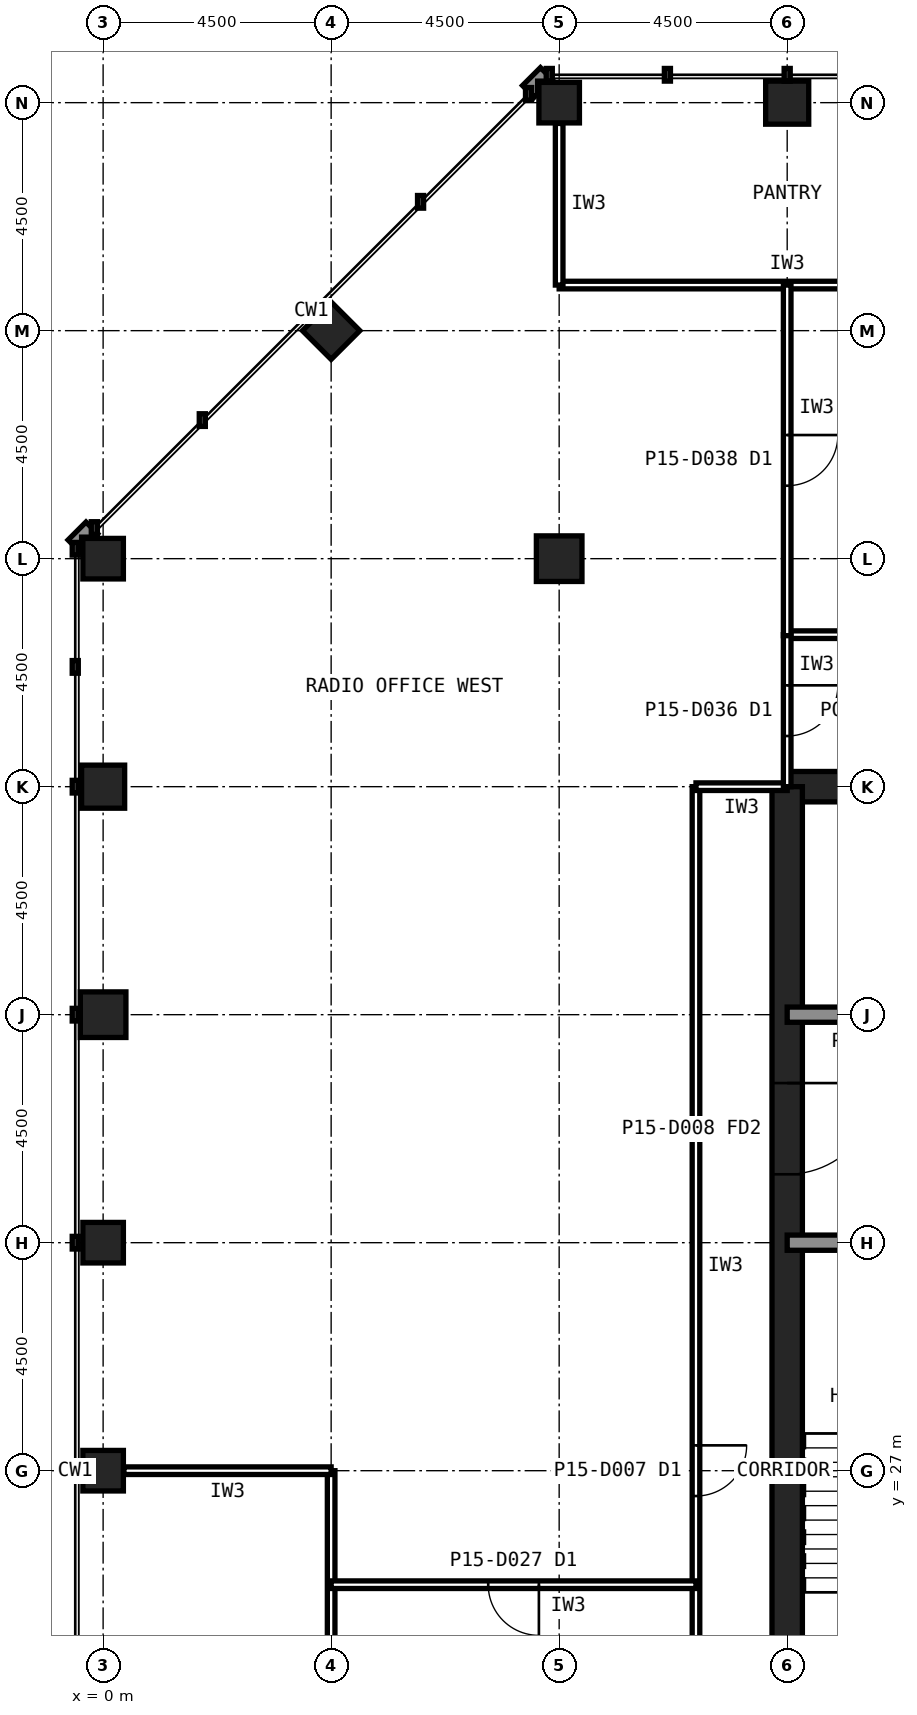
"""IFC4 building model, lengths in metres.
Left out: names, types, materials, properties, quantities, classifications, styles, units other than length and angle.
Written with IfcOpenShell. Run it as: python <this file> out.ifc"""

import sys

from ifc_helpers import new_model, si_unit, direction, frame, frame_2d, origin, origin_2d, place, context, subcontext, project, spatial, rectangle, hollow_rectangle, extrude, element, fill, save


model = new_model("IFC4")
c1 = context("Model", 3, precision=1e-05, world=origin(), true_north=direction((0.0, 1.0)))
c2 = subcontext(c1, "Body", "Model", "MODEL_VIEW")
j1 = project(units=[si_unit("LENGTHUNIT", "METRE"), si_unit("PLANEANGLEUNIT", "RADIAN")], contexts=[c1])
p1 = place(None, origin())
s1 = spatial("IfcSite", under=j1, at=p1, CompositionType="ELEMENT")
p2 = place(p1, origin())
s2 = spatial("IfcBuilding", under=s1, at=p2, CompositionType="ELEMENT")
p3 = place(p2, frame((0.0, 0.0, 62.6)))
s3 = spatial("IfcBuildingStorey", under=s2, at=p3, CompositionType="ELEMENT", Elevation=62.6)
p4 = place(p3, frame((13.5, 54.0, 0.0), z_axis=(0.0, 0.0, 1.0), x_axis=(1.0, 0.0, 0.0)))
e1 = element("IfcColumn", 1, at=p4, inside=s3, PredefinedType="COLUMN", context=c2, shape_type="SweptSolid", body=[
    extrude(hollow_rectangle(XDim=0.85, YDim=0.85, WallThickness=0.05, at=origin_2d()), origin(), (0.0, 0.0, 1.0), 4.2),
])
for number, where, z_axis, x_axis in (
    (2, (9.0, 54.0, 0.0), (0.0, 0.0, 1.0), (1.0, 0.0, 0.0)),
    (3, (0.0, 45.0, 0.0), (0.0, 0.0, 1.0), (1.0, 0.0, 0.0)),
):
    element("IfcColumn", number, at=place(p3, frame(where, z_axis=z_axis, x_axis=x_axis)), inside=s3, PredefinedType="COLUMN", context=c2, shape_type="SweptSolid", body=[
        extrude(hollow_rectangle(XDim=0.8, YDim=0.8, WallThickness=0.045, at=origin_2d()), origin(), (0.0, 0.0, 1.0), 4.2),
    ])
p5 = place(p3, frame((0.0, 40.5, 0.0), z_axis=(0.0, 0.0, 1.0), x_axis=(1.0, 0.0, 0.0)))
e4 = element("IfcColumn", 4, at=p5, inside=s3, PredefinedType="COLUMN", context=c2, shape_type="SweptSolid", body=[
    extrude(hollow_rectangle(XDim=0.85, YDim=0.85, WallThickness=0.05, at=origin_2d()), origin(), (0.0, 0.0, 1.0), 4.2),
])
p6 = place(p3, frame((0.0, 36.0, 0.0), z_axis=(0.0, 0.0, 1.0), x_axis=(1.0, 0.0, 0.0)))
e5 = element("IfcColumn", 5, at=p6, inside=s3, PredefinedType="COLUMN", context=c2, shape_type="SweptSolid", body=[
    extrude(hollow_rectangle(XDim=0.9, YDim=0.9, WallThickness=0.063, at=origin_2d()), origin(), (0.0, 0.0, 1.0), 4.2),
])
for number, where, z_axis, x_axis in (
    (6, (0.0, 31.5, 0.0), (0.0, 0.0, 1.0), (1.0, 0.0, 0.0)),
    (7, (0.0, 27.0, 0.0), (0.0, 0.0, 1.0), (1.0, 0.0, 0.0)),
    (8, (4.5, 49.5, 0.0), (0.0, 0.0, 1.0), (0.707, 0.707, 0.0)),
):
    element("IfcColumn", number, at=place(p3, frame(where, z_axis=z_axis, x_axis=x_axis)), inside=s3, PredefinedType="COLUMN", context=c2, shape_type="SweptSolid", body=[
        extrude(hollow_rectangle(XDim=0.8, YDim=0.8, WallThickness=0.045, at=origin_2d()), origin(), (0.0, 0.0, 1.0), 4.2),
    ])
p7 = place(p3, frame((9.0, 45.0, 0.0), z_axis=(0.0, 0.0, 1.0), x_axis=(1.0, 0.0, 0.0)))
e9 = element("IfcColumn", 9, at=p7, inside=s3, PredefinedType="COLUMN", context=c2, shape_type="SweptSolid", body=[
    extrude(hollow_rectangle(XDim=0.9, YDim=0.9, WallThickness=0.063, at=origin_2d()), origin(), (0.0, 0.0, 1.0), 4.2),
])
p8 = place(p3, frame((40.5, 40.5, 0.0), z_axis=(0.0, 0.0, 1.0), x_axis=(-1.0, 0.0, 0.0)))
e10 = element("IfcWall", 10, at=p8, inside=s3, PredefinedType="SHEAR", context=c2, shape_type="SweptSolid", body=[
    extrude(rectangle(XDim=27.0, YDim=0.6, at=frame_2d((13.5, 0.0))), origin(), (0.0, 0.0, 1.0), 4.2),
])
p9 = place(p3, frame((13.5, 40.5, 0.0), z_axis=(0.0, 0.0, 1.0), x_axis=(0.0, -1.0, 0.0)))
e11 = element("IfcWall", 11, at=p9, inside=s3, PredefinedType="SHEAR", context=c2, shape_type="SweptSolid", body=[
    extrude(rectangle(XDim=27.0, YDim=0.6, at=frame_2d((13.5, 0.0))), origin(), (0.0, 0.0, 1.0), 4.2),
])
p10 = place(p9, frame((19.65, 0.0, 0.0)))
e12 = element("IfcOpeningElement", 12, at=p10, cuts=e11, PredefinedType="OPENING", context=c2, shape_type="SweptSolid", body=[
    extrude(rectangle(XDim=1.2, YDim=2.1, at=frame_2d((0.6, 1.05))), frame((0.0, 0.31, 0.0), z_axis=(0.0, -1.0, 0.0), x_axis=(1.0, 0.0, 0.0)), (0.0, 0.0, 1.0), 0.62),
])
p11 = place(p9, frame((5.85, 0.0, 0.0)))
e13 = element("IfcOpeningElement", 13, at=p11, cuts=e11, PredefinedType="OPENING", context=c2, shape_type="SweptSolid", body=[
    extrude(rectangle(XDim=1.8, YDim=2.1, at=frame_2d((0.9, 1.05))), frame((0.0, 0.31, 0.0), z_axis=(0.0, -1.0, 0.0), x_axis=(1.0, 0.0, 0.0)), (0.0, 0.0, 1.0), 0.62),
])
p12 = place(p3, frame((13.5, 36.0, 0.0), z_axis=(0.0, 0.0, 1.0), x_axis=(1.0, 0.0, 0.0)))
e14 = element("IfcWall", 14, at=p12, inside=s3, PredefinedType="SOLIDWALL", context=c2, shape_type="SweptSolid", body=[
    extrude(rectangle(XDim=27.0, YDim=0.3, at=frame_2d((13.5, 0.0))), origin(), (0.0, 0.0, 1.0), 4.04),
])
p13 = place(p12, frame((1.8, 0.0, 0.0)))
e15 = element("IfcOpeningElement", 15, at=p13, cuts=e14, PredefinedType="OPENING", context=c2, shape_type="SweptSolid", body=[
    extrude(rectangle(XDim=0.9, YDim=2.1, at=frame_2d((0.45, 1.05))), frame((0.0, 0.16, 0.0), z_axis=(0.0, -1.0, 0.0), x_axis=(1.0, 0.0, 0.0)), (0.0, 0.0, 1.0), 0.32),
])
p14 = place(p12, frame((24.1, 0.0, 0.0)))
e16 = element("IfcOpeningElement", 16, at=p14, cuts=e14, PredefinedType="OPENING", context=c2, shape_type="SweptSolid", body=[
    extrude(rectangle(XDim=1.3, YDim=2.2, at=frame_2d((0.65, 1.1))), frame((0.0, 0.16, 0.0), z_axis=(0.0, -1.0, 0.0), x_axis=(1.0, 0.0, 0.0)), (0.0, 0.0, 1.0), 0.32),
])
p15 = place(p3, frame((13.5, 31.5, 0.0), z_axis=(0.0, 0.0, 1.0), x_axis=(1.0, 0.0, 0.0)))
e17 = element("IfcWall", 17, at=p15, inside=s3, PredefinedType="SOLIDWALL", context=c2, shape_type="SweptSolid", body=[
    extrude(rectangle(XDim=27.0, YDim=0.3, at=frame_2d((13.5, 0.0))), origin(), (0.0, 0.0, 1.0), 4.04),
])
p16 = place(p15, frame((24.15, 0.0, 0.0)))
e18 = element("IfcOpeningElement", 18, at=p16, cuts=e17, PredefinedType="OPENING", context=c2, shape_type="SweptSolid", body=[
    extrude(rectangle(XDim=1.2, YDim=2.1, at=frame_2d((0.6, 1.05))), frame((0.0, 0.16, 0.0), z_axis=(0.0, -1.0, 0.0), x_axis=(1.0, 0.0, 0.0)), (0.0, 0.0, 1.0), 0.32),
])
p17 = place(p15, frame((15.3, 0.0, 0.0)))
e19 = element("IfcOpeningElement", 19, at=p17, cuts=e17, PredefinedType="OPENING", context=c2, shape_type="SweptSolid", body=[
    extrude(rectangle(XDim=0.9, YDim=2.1, at=frame_2d((0.45, 1.05))), frame((0.0, 0.16, 0.0), z_axis=(0.0, -1.0, 0.0), x_axis=(1.0, 0.0, 0.0)), (0.0, 0.0, 1.0), 0.32),
])
p18 = place(p15, frame((19.8, 0.0, 0.0)))
e20 = element("IfcOpeningElement", 20, at=p18, cuts=e17, PredefinedType="OPENING", context=c2, shape_type="SweptSolid", body=[
    extrude(rectangle(XDim=0.9, YDim=2.1, at=frame_2d((0.45, 1.05))), frame((0.0, 0.16, 0.0), z_axis=(0.0, -1.0, 0.0), x_axis=(1.0, 0.0, 0.0)), (0.0, 0.0, 1.0), 0.32),
])
p19 = place(p3, frame((11.7, 40.5, 0.0), z_axis=(0.0, 0.0, 1.0), x_axis=(0.0, -1.0, 0.0)))
e21 = element("IfcWall", 21, at=p19, inside=s3, PredefinedType="PARTITIONING", context=c2, shape_type="SweptSolid", body=[
    extrude(rectangle(XDim=27.0, YDim=0.15, at=frame_2d((13.5, 0.0))), origin(), (0.0, 0.0, 1.0), 4.04),
])
p20 = place(p19, frame((13.0, 0.0, 0.0)))
e22 = element("IfcOpeningElement", 22, at=p20, cuts=e21, PredefinedType="OPENING", context=c2, shape_type="SweptSolid", body=[
    extrude(rectangle(XDim=1.0, YDim=2.1, at=frame_2d((0.5, 1.05))), frame((0.0, 0.085, 0.0), z_axis=(0.0, -1.0, 0.0), x_axis=(1.0, 0.0, 0.0)), (0.0, 0.0, 1.0), 0.17),
])
p21 = place(p3, frame((13.5, 40.5, 0.0), z_axis=(0.0, 0.0, 1.0), x_axis=(-1.0, 0.0, 0.0)))
e23 = element("IfcWall", 23, at=p21, inside=s3, PredefinedType="PARTITIONING", context=c2, shape_type="SweptSolid", body=[
    extrude(rectangle(XDim=1.8, YDim=0.15, at=frame_2d((0.9, 0.0))), origin(), (0.0, 0.0, 1.0), 3.189),
])
p22 = place(p3, frame((16.875, 43.5, 0.0), z_axis=(0.0, 0.0, 1.0), x_axis=(-1.0, 0.0, 0.0)))
e24 = element("IfcWall", 24, at=p22, inside=s3, PredefinedType="PARTITIONING", context=c2, shape_type="SweptSolid", body=[
    extrude(rectangle(XDim=3.375, YDim=0.15, at=frame_2d((1.688, 0.0))), origin(), (0.0, 0.0, 1.0), 4.04),
])
p23 = place(p3, frame((13.5, 43.5, 0.0), z_axis=(0.0, 0.0, 1.0), x_axis=(0.0, -1.0, 0.0)))
e25 = element("IfcWall", 25, at=p23, inside=s3, PredefinedType="PARTITIONING", context=c2, shape_type="SweptSolid", body=[
    extrude(rectangle(XDim=3.0, YDim=0.15, at=frame_2d((1.5, 0.0))), origin(), (0.0, 0.0, 1.0), 3.189),
])
p24 = place(p23, frame((1.0, 0.0, 0.0)))
e26 = element("IfcOpeningElement", 26, at=p24, cuts=e25, PredefinedType="OPENING", context=c2, shape_type="SweptSolid", body=[
    extrude(rectangle(XDim=1.0, YDim=2.1, at=frame_2d((0.5, 1.05))), frame((0.0, 0.085, 0.0), z_axis=(0.0, -1.0, 0.0), x_axis=(1.0, 0.0, 0.0)), (0.0, 0.0, 1.0), 0.17),
])
p25 = place(p3, frame((4.5, 18.0, 0.0), z_axis=(0.0, 0.0, 1.0), x_axis=(0.0, 1.0, 0.0)))
e27 = element("IfcWall", 27, at=p25, inside=s3, PredefinedType="PARTITIONING", context=c2, shape_type="SweptSolid", body=[
    extrude(rectangle(XDim=9.0, YDim=0.15, at=frame_2d((4.5, 0.0))), origin(), (0.0, 0.0, 1.0), 4.04),
])
p26 = place(p25, frame((4.0, 0.0, 0.0)))
e28 = element("IfcOpeningElement", 28, at=p26, cuts=e27, PredefinedType="OPENING", context=c2, shape_type="SweptSolid", body=[
    extrude(rectangle(XDim=1.0, YDim=2.1, at=frame_2d((0.5, 1.05))), frame((0.0, 0.085, 0.0), z_axis=(0.0, -1.0, 0.0), x_axis=(1.0, 0.0, 0.0)), (0.0, 0.0, 1.0), 0.17),
])
p27 = place(p3, frame((4.5, 27.0, 0.0), z_axis=(0.0, 0.0, 1.0), x_axis=(-1.0, 0.0, 0.0)))
e29 = element("IfcWall", 29, at=p27, inside=s3, PredefinedType="PARTITIONING", context=c2, shape_type="SweptSolid", body=[
    extrude(rectangle(XDim=4.09, YDim=0.15, at=frame_2d((2.045, 0.0))), origin(), (0.0, 0.0, 1.0), 3.189),
])
p28 = place(p3, frame((9.0, 50.4, 0.0), z_axis=(0.0, 0.0, 1.0), x_axis=(1.0, 0.0, 0.0)))
e30 = element("IfcWall", 30, at=p28, inside=s3, PredefinedType="PARTITIONING", context=c2, shape_type="SweptSolid", body=[
    extrude(rectangle(XDim=9.0, YDim=0.15, at=frame_2d((4.5, 0.0))), origin(), (0.0, 0.0, 1.0), 4.04),
])
p29 = place(p3, frame((9.0, 53.59, 0.0), z_axis=(0.0, 0.0, 1.0), x_axis=(0.0, -1.0, 0.0)))
e31 = element("IfcWall", 31, at=p29, inside=s3, PredefinedType="PARTITIONING", context=c2, shape_type="SweptSolid", body=[
    extrude(rectangle(XDim=3.19, YDim=0.15, at=frame_2d((1.595, 0.0))), origin(), (0.0, 0.0, 1.0), 3.429),
])
p30 = place(p3, frame((13.5, 50.4, 0.0), z_axis=(0.0, 0.0, 1.0), x_axis=(0.0, -1.0, 0.0)))
e32 = element("IfcWall", 32, at=p30, inside=s3, PredefinedType="PARTITIONING", context=c2, shape_type="SweptSolid", body=[
    extrude(rectangle(XDim=6.92, YDim=0.15, at=frame_2d((3.46, 0.0))), origin(), (0.0, 0.0, 1.0), 3.189),
])
p31 = place(p30, frame((2.96, 0.0, 0.0)))
e33 = element("IfcOpeningElement", 33, at=p31, cuts=e32, PredefinedType="OPENING", context=c2, shape_type="SweptSolid", body=[
    extrude(rectangle(XDim=1.0, YDim=2.1, at=frame_2d((0.5, 1.05))), frame((0.0, 0.085, 0.0), z_axis=(0.0, -1.0, 0.0), x_axis=(1.0, 0.0, 0.0)), (0.0, 0.0, 1.0), 0.17),
])
p32 = place(p3, frame((11.7, 24.75, 0.0), z_axis=(0.0, 0.0, 1.0), x_axis=(-1.0, 0.0, 0.0)))
e34 = element("IfcWall", 34, at=p32, inside=s3, PredefinedType="PARTITIONING", context=c2, shape_type="SweptSolid", body=[
    extrude(rectangle(XDim=7.2, YDim=0.15, at=frame_2d((3.6, 0.0))), origin(), (0.0, 0.0, 1.0), 4.04),
])
p33 = place(p32, frame((3.1, 0.0, 0.0)))
e35 = element("IfcOpeningElement", 35, at=p33, cuts=e34, PredefinedType="OPENING", context=c2, shape_type="SweptSolid", body=[
    extrude(rectangle(XDim=1.0, YDim=2.1, at=frame_2d((0.5, 1.05))), frame((0.0, 0.085, 0.0), z_axis=(0.0, -1.0, 0.0), x_axis=(1.0, 0.0, 0.0)), (0.0, 0.0, 1.0), 0.17),
])
p34 = place(p11, origin())
e36 = element("IfcDoor", 36, at=p34, inside=s3, OperationType="SINGLE_SWING_LEFT", PredefinedType="DOOR", context=c2, shape_type="SweptSolid", body=[
    extrude(rectangle(XDim=1.8, YDim=2.1, at=frame_2d((0.9, 1.05))), frame((0.0, 0.025, 0.0), z_axis=(0.0, -1.0, 0.0), x_axis=(1.0, 0.0, 0.0)), (0.0, 0.0, 1.0), 0.05),
])
fill(e13, e36)
p35 = place(p20, origin())
e37 = element("IfcDoor", 37, at=p35, inside=s3, OperationType="SINGLE_SWING_LEFT", PredefinedType="DOOR", context=c2, shape_type="SweptSolid", body=[
    extrude(rectangle(XDim=1.0, YDim=2.1, at=frame_2d((0.5, 1.05))), frame((0.0, 0.025, 0.0), z_axis=(0.0, -1.0, 0.0), x_axis=(1.0, 0.0, 0.0)), (0.0, 0.0, 1.0), 0.05),
])
fill(e22, e37)
p36 = place(p24, origin())
e38 = element("IfcDoor", 38, at=p36, inside=s3, OperationType="SINGLE_SWING_LEFT", PredefinedType="DOOR", context=c2, shape_type="SweptSolid", body=[
    extrude(rectangle(XDim=1.0, YDim=2.1, at=frame_2d((0.5, 1.05))), frame((0.0, 0.025, 0.0), z_axis=(0.0, -1.0, 0.0), x_axis=(1.0, 0.0, 0.0)), (0.0, 0.0, 1.0), 0.05),
])
fill(e26, e38)
p37 = place(p31, origin())
e39 = element("IfcDoor", 39, at=p37, inside=s3, OperationType="SINGLE_SWING_LEFT", PredefinedType="DOOR", context=c2, shape_type="SweptSolid", body=[
    extrude(rectangle(XDim=1.0, YDim=2.1, at=frame_2d((0.5, 1.05))), frame((0.0, 0.025, 0.0), z_axis=(0.0, -1.0, 0.0), x_axis=(1.0, 0.0, 0.0)), (0.0, 0.0, 1.0), 0.05),
])
fill(e33, e39)
p38 = place(p33, origin())
e40 = element("IfcDoor", 40, at=p38, inside=s3, OperationType="SINGLE_SWING_LEFT", PredefinedType="DOOR", context=c2, shape_type="SweptSolid", body=[
    extrude(rectangle(XDim=1.0, YDim=2.1, at=frame_2d((0.5, 1.05))), frame((0.0, 0.025, 0.0), z_axis=(0.0, -1.0, 0.0), x_axis=(1.0, 0.0, 0.0)), (0.0, 0.0, 1.0), 0.05),
])
fill(e35, e40)
save(model, sys.argv[1])
